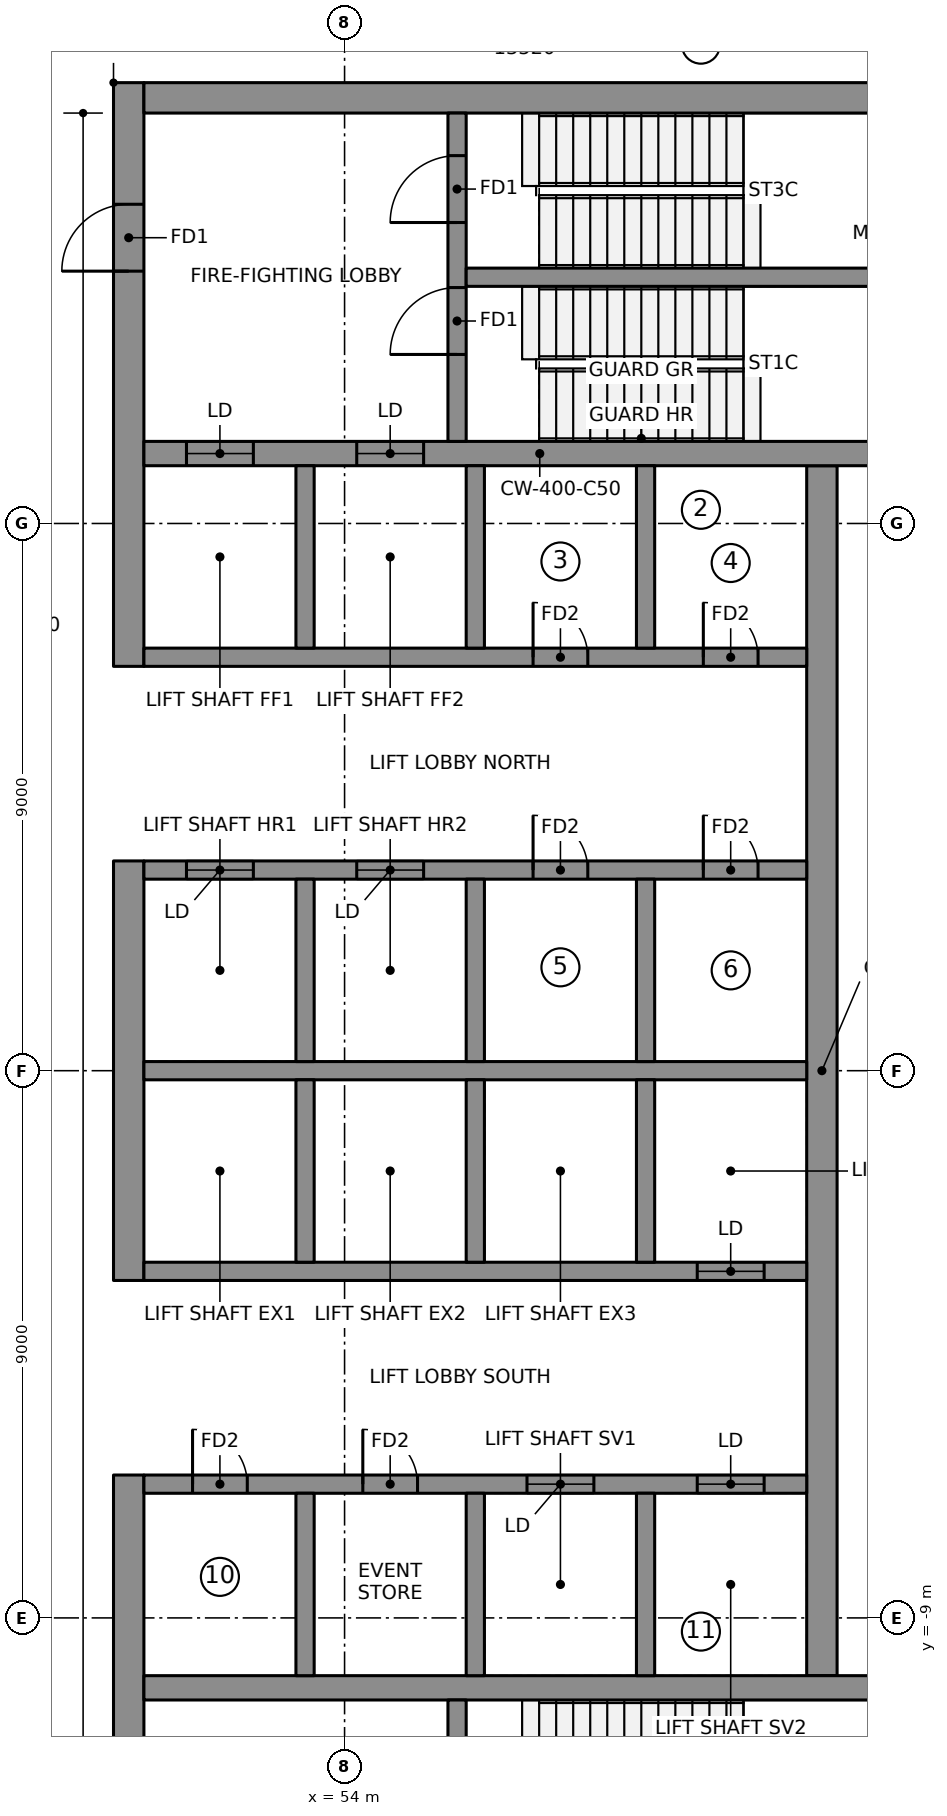
"""IFC4 building model, lengths in metres.
Left out: names, types, materials, properties, quantities, classifications, styles, units other than length and angle.
Written with IfcOpenShell. Run it as: python <this file> out.ifc"""

import sys

from ifc_helpers import new_model, si_unit, direction, frame, frame_2d, origin, place, context, subcontext, project, spatial, rectangle, extrude, element, fill, save


model = new_model("IFC4")
c1 = context("Model", 3, precision=1e-05, world=origin(), true_north=direction((0.0, 1.0)))
c2 = subcontext(c1, "Body", "Model", "MODEL_VIEW")
j1 = project(units=[si_unit("LENGTHUNIT", "METRE"), si_unit("PLANEANGLEUNIT", "RADIAN")], contexts=[c1])
p1 = place(None, origin())
s1 = spatial("IfcSite", under=j1, at=p1, CompositionType="ELEMENT")
p2 = place(p1, origin())
s2 = spatial("IfcBuilding", under=s1, at=p2, CompositionType="ELEMENT")
p3 = place(p2, frame((0.0, 0.0, 263.3)))
s3 = spatial("IfcBuildingStorey", under=s2, at=p3, CompositionType="ELEMENT", Elevation=263.3)
p4 = place(p3, frame((50.45, 6.65, 0.0), z_axis=(0.0, 0.0, 1.0), x_axis=(0.0, 1.0, 0.0)))
e1 = element("IfcWall", 1, at=p4, inside=s3, PredefinedType="SHEAR", context=c2, shape_type="SweptSolid", body=[
    extrude(rectangle(XDim=9.6, YDim=0.5, at=frame_2d((4.8, 0.0))), origin(), (0.0, 0.0, 1.0), 4.6),
])
p5 = place(p4, frame((6.5, 0.0, 0.0)))
e2 = element("IfcOpeningElement", 2, at=p5, cuts=e1, PredefinedType="OPENING", context=c2, shape_type="SweptSolid", body=[
    extrude(rectangle(XDim=1.1, YDim=2.1, at=frame_2d((0.55, 1.05))), frame((0.0, 0.26, 0.0), z_axis=(0.0, -1.0, 0.0), x_axis=(1.0, 0.0, 0.0)), (0.0, 0.0, 1.0), 0.52),
])
p6 = place(p3, frame((50.45, -3.45, 0.0), z_axis=(0.0, 0.0, 1.0), x_axis=(0.0, 1.0, 0.0)))
e3 = element("IfcWall", 3, at=p6, inside=s3, PredefinedType="SHEAR", context=c2, shape_type="SweptSolid", body=[
    extrude(rectangle(XDim=6.9, YDim=0.5, at=frame_2d((3.45, 0.0))), origin(), (0.0, 0.0, 1.0), 4.6),
])
p7 = place(p3, frame((50.45, -16.25, 0.0), z_axis=(0.0, 0.0, 1.0), x_axis=(0.0, 1.0, 0.0)))
e4 = element("IfcWall", 4, at=p7, inside=s3, PredefinedType="SHEAR", context=c2, shape_type="SweptSolid", body=[
    extrude(rectangle(XDim=9.6, YDim=0.5, at=frame_2d((4.8, 0.0))), origin(), (0.0, 0.0, 1.0), 4.6),
])
p8 = place(p7, frame((2.0, 0.0, 0.0)))
e5 = element("IfcOpeningElement", 5, at=p8, cuts=e4, PredefinedType="OPENING", context=c2, shape_type="SweptSolid", body=[
    extrude(rectangle(XDim=1.1, YDim=2.1, at=frame_2d((0.55, 1.05))), frame((0.0, 0.26, 0.0), z_axis=(0.0, -1.0, 0.0), x_axis=(1.0, 0.0, 0.0)), (0.0, 0.0, 1.0), 0.52),
])
p9 = place(p3, frame((50.7, 16.0, 0.0), z_axis=(0.0, 0.0, 1.0), x_axis=(1.0, 0.0, 0.0)))
e6 = element("IfcWall", 6, at=p9, inside=s3, PredefinedType="SHEAR", context=c2, shape_type="SweptSolid", body=[
    extrude(rectangle(XDim=13.52, YDim=0.5, at=frame_2d((6.76, 0.0))), origin(), (0.0, 0.0, 1.0), 4.6),
])
p10 = place(p3, frame((61.85, -9.95, 0.0), z_axis=(0.0, 0.0, 1.0), x_axis=(0.0, 1.0, 0.0)))
e7 = element("IfcWall", 7, at=p10, inside=s3, PredefinedType="SHEAR", context=c2, shape_type="SweptSolid", body=[
    extrude(rectangle(XDim=19.9, YDim=0.5, at=frame_2d((9.95, 0.0))), origin(), (0.0, 0.0, 1.0), 4.6),
])
p11 = place(p3, frame((50.7, 10.15, 0.0), z_axis=(0.0, 0.0, 1.0), x_axis=(1.0, 0.0, 0.0)))
e8 = element("IfcWall", 8, at=p11, inside=s3, PredefinedType="SHEAR", context=c2, shape_type="SweptSolid", body=[
    extrude(rectangle(XDim=13.02, YDim=0.4, at=frame_2d((6.51, 0.0))), origin(), (0.0, 0.0, 1.0), 4.6),
])
p12 = place(p11, frame((0.7, 0.0, 0.0)))
e9 = element("IfcOpeningElement", 9, at=p12, cuts=e8, PredefinedType="OPENING", context=c2, shape_type="SweptSolid", body=[
    extrude(rectangle(XDim=1.1, YDim=2.1, at=frame_2d((0.55, 1.05))), frame((0.0, 0.21, 0.0), z_axis=(0.0, -1.0, 0.0), x_axis=(1.0, 0.0, 0.0)), (0.0, 0.0, 1.0), 0.42),
])
p13 = place(p11, frame((3.5, 0.0, 0.0)))
e10 = element("IfcOpeningElement", 10, at=p13, cuts=e8, PredefinedType="OPENING", context=c2, shape_type="SweptSolid", body=[
    extrude(rectangle(XDim=1.1, YDim=2.1, at=frame_2d((0.55, 1.05))), frame((0.0, 0.21, 0.0), z_axis=(0.0, -1.0, 0.0), x_axis=(1.0, 0.0, 0.0)), (0.0, 0.0, 1.0), 0.42),
])
p14 = place(p3, frame((50.7, -10.15, 0.0), z_axis=(0.0, 0.0, 1.0), x_axis=(1.0, 0.0, 0.0)))
e11 = element("IfcWall", 11, at=p14, inside=s3, PredefinedType="SHEAR", context=c2, shape_type="SweptSolid", body=[
    extrude(rectangle(XDim=13.02, YDim=0.4, at=frame_2d((6.51, 0.0))), origin(), (0.0, 0.0, 1.0), 4.6),
])
p15 = place(p3, frame((50.7, 0.0, 0.0), z_axis=(0.0, 0.0, 1.0), x_axis=(1.0, 0.0, 0.0)))
e12 = element("IfcWall", 12, at=p15, inside=s3, PredefinedType="SHEAR", context=c2, shape_type="SweptSolid", body=[
    extrude(rectangle(XDim=10.9, YDim=0.3, at=frame_2d((5.45, 0.0))), origin(), (0.0, 0.0, 1.0), 4.6),
])
p16 = place(p3, frame((50.7, 3.3, 0.0), z_axis=(0.0, 0.0, 1.0), x_axis=(1.0, 0.0, 0.0)))
e13 = element("IfcWall", 13, at=p16, inside=s3, PredefinedType="SHEAR", context=c2, shape_type="SweptSolid", body=[
    extrude(rectangle(XDim=10.9, YDim=0.3, at=frame_2d((5.45, 0.0))), origin(), (0.0, 0.0, 1.0), 4.6),
])
p17 = place(p16, frame((0.7, 0.0, 0.0)))
e14 = element("IfcOpeningElement", 14, at=p17, cuts=e13, PredefinedType="OPENING", context=c2, shape_type="SweptSolid", body=[
    extrude(rectangle(XDim=1.1, YDim=2.1, at=frame_2d((0.55, 1.05))), frame((0.0, 0.16, 0.0), z_axis=(0.0, -1.0, 0.0), x_axis=(1.0, 0.0, 0.0)), (0.0, 0.0, 1.0), 0.32),
])
p18 = place(p16, frame((3.5, 0.0, 0.0)))
e15 = element("IfcOpeningElement", 15, at=p18, cuts=e13, PredefinedType="OPENING", context=c2, shape_type="SweptSolid", body=[
    extrude(rectangle(XDim=1.1, YDim=2.1, at=frame_2d((0.55, 1.05))), frame((0.0, 0.16, 0.0), z_axis=(0.0, -1.0, 0.0), x_axis=(1.0, 0.0, 0.0)), (0.0, 0.0, 1.0), 0.32),
])
p19 = place(p16, frame((6.4, 0.0, 0.0)))
e16 = element("IfcOpeningElement", 16, at=p19, cuts=e13, PredefinedType="OPENING", context=c2, shape_type="SweptSolid", body=[
    extrude(rectangle(XDim=0.9, YDim=2.1, at=frame_2d((0.45, 1.05))), frame((0.0, 0.16, 0.0), z_axis=(0.0, -1.0, 0.0), x_axis=(1.0, 0.0, 0.0)), (0.0, 0.0, 1.0), 0.32),
])
p20 = place(p16, frame((9.2, 0.0, 0.0)))
e17 = element("IfcOpeningElement", 17, at=p20, cuts=e13, PredefinedType="OPENING", context=c2, shape_type="SweptSolid", body=[
    extrude(rectangle(XDim=0.9, YDim=2.1, at=frame_2d((0.45, 1.05))), frame((0.0, 0.16, 0.0), z_axis=(0.0, -1.0, 0.0), x_axis=(1.0, 0.0, 0.0)), (0.0, 0.0, 1.0), 0.32),
])
p21 = place(p3, frame((50.7, 6.8, 0.0), z_axis=(0.0, 0.0, 1.0), x_axis=(1.0, 0.0, 0.0)))
e18 = element("IfcWall", 18, at=p21, inside=s3, PredefinedType="SHEAR", context=c2, shape_type="SweptSolid", body=[
    extrude(rectangle(XDim=10.9, YDim=0.3, at=frame_2d((5.45, 0.0))), origin(), (0.0, 0.0, 1.0), 4.6),
])
p22 = place(p21, frame((6.4, 0.0, 0.0)))
e19 = element("IfcOpeningElement", 19, at=p22, cuts=e18, PredefinedType="OPENING", context=c2, shape_type="SweptSolid", body=[
    extrude(rectangle(XDim=0.9, YDim=2.1, at=frame_2d((0.45, 1.05))), frame((0.0, 0.16, 0.0), z_axis=(0.0, -1.0, 0.0), x_axis=(1.0, 0.0, 0.0)), (0.0, 0.0, 1.0), 0.32),
])
p23 = place(p21, frame((9.2, 0.0, 0.0)))
e20 = element("IfcOpeningElement", 20, at=p23, cuts=e18, PredefinedType="OPENING", context=c2, shape_type="SweptSolid", body=[
    extrude(rectangle(XDim=0.9, YDim=2.1, at=frame_2d((0.45, 1.05))), frame((0.0, 0.16, 0.0), z_axis=(0.0, -1.0, 0.0), x_axis=(1.0, 0.0, 0.0)), (0.0, 0.0, 1.0), 0.32),
])
for number, where, z_axis, x_axis in (
    (21, (53.35, 0.15, 0.0), (0.0, 0.0, 1.0), (0.0, 1.0, 0.0)),
    (22, (53.35, 6.95, 0.0), (0.0, 0.0, 1.0), (0.0, 1.0, 0.0)),
    (23, (56.15, 0.15, 0.0), (0.0, 0.0, 1.0), (0.0, 1.0, 0.0)),
    (24, (56.15, 6.95, 0.0), (0.0, 0.0, 1.0), (0.0, 1.0, 0.0)),
    (25, (58.95, 0.15, 0.0), (0.0, 0.0, 1.0), (0.0, 1.0, 0.0)),
    (26, (58.95, 6.95, 0.0), (0.0, 0.0, 1.0), (0.0, 1.0, 0.0)),
):
    element("IfcWall", number, at=place(p3, frame(where, z_axis=z_axis, x_axis=x_axis)), inside=s3, PredefinedType="SHEAR", context=c2, shape_type="SweptSolid", body=[
        extrude(rectangle(XDim=3.0, YDim=0.3, at=frame_2d((1.5, 0.0))), origin(), (0.0, 0.0, 1.0), 4.6),
    ])
p24 = place(p3, frame((50.7, -3.3, 0.0), z_axis=(0.0, 0.0, 1.0), x_axis=(1.0, 0.0, 0.0)))
e27 = element("IfcWall", 27, at=p24, inside=s3, PredefinedType="SHEAR", context=c2, shape_type="SweptSolid", body=[
    extrude(rectangle(XDim=10.9, YDim=0.3, at=frame_2d((5.45, 0.0))), origin(), (0.0, 0.0, 1.0), 4.6),
])
p25 = place(p24, frame((9.1, 0.0, 0.0)))
e28 = element("IfcOpeningElement", 28, at=p25, cuts=e27, PredefinedType="OPENING", context=c2, shape_type="SweptSolid", body=[
    extrude(rectangle(XDim=1.1, YDim=2.1, at=frame_2d((0.55, 1.05))), frame((0.0, 0.16, 0.0), z_axis=(0.0, -1.0, 0.0), x_axis=(1.0, 0.0, 0.0)), (0.0, 0.0, 1.0), 0.32),
])
p26 = place(p3, frame((50.7, -6.8, 0.0), z_axis=(0.0, 0.0, 1.0), x_axis=(1.0, 0.0, 0.0)))
e29 = element("IfcWall", 29, at=p26, inside=s3, PredefinedType="SHEAR", context=c2, shape_type="SweptSolid", body=[
    extrude(rectangle(XDim=10.9, YDim=0.3, at=frame_2d((5.45, 0.0))), origin(), (0.0, 0.0, 1.0), 4.6),
])
p27 = place(p26, frame((6.3, 0.0, 0.0)))
e30 = element("IfcOpeningElement", 30, at=p27, cuts=e29, PredefinedType="OPENING", context=c2, shape_type="SweptSolid", body=[
    extrude(rectangle(XDim=1.1, YDim=2.1, at=frame_2d((0.55, 1.05))), frame((0.0, 0.16, 0.0), z_axis=(0.0, -1.0, 0.0), x_axis=(1.0, 0.0, 0.0)), (0.0, 0.0, 1.0), 0.32),
])
p28 = place(p26, frame((9.1, 0.0, 0.0)))
e31 = element("IfcOpeningElement", 31, at=p28, cuts=e29, PredefinedType="OPENING", context=c2, shape_type="SweptSolid", body=[
    extrude(rectangle(XDim=1.1, YDim=2.1, at=frame_2d((0.55, 1.05))), frame((0.0, 0.16, 0.0), z_axis=(0.0, -1.0, 0.0), x_axis=(1.0, 0.0, 0.0)), (0.0, 0.0, 1.0), 0.32),
])
p29 = place(p26, frame((0.8, 0.0, 0.0)))
e32 = element("IfcOpeningElement", 32, at=p29, cuts=e29, PredefinedType="OPENING", context=c2, shape_type="SweptSolid", body=[
    extrude(rectangle(XDim=0.9, YDim=2.1, at=frame_2d((0.45, 1.05))), frame((0.0, 0.16, 0.0), z_axis=(0.0, -1.0, 0.0), x_axis=(1.0, 0.0, 0.0)), (0.0, 0.0, 1.0), 0.32),
])
p30 = place(p26, frame((3.6, 0.0, 0.0)))
e33 = element("IfcOpeningElement", 33, at=p30, cuts=e29, PredefinedType="OPENING", context=c2, shape_type="SweptSolid", body=[
    extrude(rectangle(XDim=0.9, YDim=2.1, at=frame_2d((0.45, 1.05))), frame((0.0, 0.16, 0.0), z_axis=(0.0, -1.0, 0.0), x_axis=(1.0, 0.0, 0.0)), (0.0, 0.0, 1.0), 0.32),
])
for number, where, z_axis, x_axis in (
    (34, (53.35, -3.15, 0.0), (0.0, 0.0, 1.0), (0.0, 1.0, 0.0)),
    (35, (53.35, -9.95, 0.0), (0.0, 0.0, 1.0), (0.0, 1.0, 0.0)),
    (36, (56.15, -3.15, 0.0), (0.0, 0.0, 1.0), (0.0, 1.0, 0.0)),
    (37, (56.15, -9.95, 0.0), (0.0, 0.0, 1.0), (0.0, 1.0, 0.0)),
    (38, (58.95, -3.15, 0.0), (0.0, 0.0, 1.0), (0.0, 1.0, 0.0)),
    (39, (58.95, -9.95, 0.0), (0.0, 0.0, 1.0), (0.0, 1.0, 0.0)),
):
    element("IfcWall", number, at=place(p3, frame(where, z_axis=z_axis, x_axis=x_axis)), inside=s3, PredefinedType="SHEAR", context=c2, shape_type="SweptSolid", body=[
        extrude(rectangle(XDim=3.0, YDim=0.3, at=frame_2d((1.5, 0.0))), origin(), (0.0, 0.0, 1.0), 4.6),
    ])
p31 = place(p3, frame((55.85, 10.35, 0.0), z_axis=(0.0, 0.0, 1.0), x_axis=(0.0, 1.0, 0.0)))
e40 = element("IfcWall", 40, at=p31, inside=s3, PredefinedType="SHEAR", context=c2, shape_type="SweptSolid", body=[
    extrude(rectangle(XDim=5.4, YDim=0.3, at=frame_2d((2.7, 0.0))), origin(), (0.0, 0.0, 1.0), 4.6),
])
p32 = place(p31, frame((1.43, 0.0, 0.0)))
e41 = element("IfcOpeningElement", 41, at=p32, cuts=e40, PredefinedType="OPENING", context=c2, shape_type="SweptSolid", body=[
    extrude(rectangle(XDim=1.1, YDim=2.1, at=frame_2d((0.55, 1.05))), frame((0.0, 0.16, 0.0), z_axis=(0.0, -1.0, 0.0), x_axis=(1.0, 0.0, 0.0)), (0.0, 0.0, 1.0), 0.32),
])
p33 = place(p31, frame((3.6, 0.0, 0.0)))
e42 = element("IfcOpeningElement", 42, at=p33, cuts=e40, PredefinedType="OPENING", context=c2, shape_type="SweptSolid", body=[
    extrude(rectangle(XDim=1.1, YDim=2.1, at=frame_2d((0.55, 1.05))), frame((0.0, 0.16, 0.0), z_axis=(0.0, -1.0, 0.0), x_axis=(1.0, 0.0, 0.0)), (0.0, 0.0, 1.0), 0.32),
])
p34 = place(p3, frame((55.85, -15.75, 0.0), z_axis=(0.0, 0.0, 1.0), x_axis=(0.0, 1.0, 0.0)))
e43 = element("IfcWall", 43, at=p34, inside=s3, PredefinedType="SHEAR", context=c2, shape_type="SweptSolid", body=[
    extrude(rectangle(XDim=5.4, YDim=0.3, at=frame_2d((2.7, 0.0))), origin(), (0.0, 0.0, 1.0), 4.6),
])
p35 = place(p34, frame((3.6, 0.0, 0.0)))
e44 = element("IfcOpeningElement", 44, at=p35, cuts=e43, PredefinedType="OPENING", context=c2, shape_type="SweptSolid", body=[
    extrude(rectangle(XDim=1.1, YDim=2.1, at=frame_2d((0.55, 1.05))), frame((0.0, 0.16, 0.0), z_axis=(0.0, -1.0, 0.0), x_axis=(1.0, 0.0, 0.0)), (0.0, 0.0, 1.0), 0.32),
])
p36 = place(p34, frame((0.8, 0.0, 0.0)))
e45 = element("IfcOpeningElement", 45, at=p36, cuts=e43, PredefinedType="OPENING", context=c2, shape_type="SweptSolid", body=[
    extrude(rectangle(XDim=0.9, YDim=2.1, at=frame_2d((0.45, 1.05))), frame((0.0, 0.16, 0.0), z_axis=(0.0, -1.0, 0.0), x_axis=(1.0, 0.0, 0.0)), (0.0, 0.0, 1.0), 0.32),
])
p37 = place(p3, frame((56.0, 13.05, 0.0), z_axis=(0.0, 0.0, 1.0), x_axis=(1.0, 0.0, 0.0)))
e46 = element("IfcWall", 46, at=p37, inside=s3, PredefinedType="SHEAR", context=c2, shape_type="SweptSolid", body=[
    extrude(rectangle(XDim=7.72, YDim=0.3, at=frame_2d((3.86, 0.0))), origin(), (0.0, 0.0, 1.0), 4.6),
])
p38 = place(p12, origin())
e47 = element("IfcDoor", 47, at=p38, inside=s3, OperationType="DOUBLE_DOOR_SLIDING", PredefinedType="DOOR", context=c2, shape_type="SweptSolid", body=[
    extrude(rectangle(XDim=1.1, YDim=2.1, at=frame_2d((0.55, 1.05))), frame((0.0, 0.025, 0.0), z_axis=(0.0, -1.0, 0.0), x_axis=(1.0, 0.0, 0.0)), (0.0, 0.0, 1.0), 0.05),
])
fill(e9, e47)
p39 = place(p13, origin())
e48 = element("IfcDoor", 48, at=p39, inside=s3, OperationType="DOUBLE_DOOR_SLIDING", PredefinedType="DOOR", context=c2, shape_type="SweptSolid", body=[
    extrude(rectangle(XDim=1.1, YDim=2.1, at=frame_2d((0.55, 1.05))), frame((0.0, 0.025, 0.0), z_axis=(0.0, -1.0, 0.0), x_axis=(1.0, 0.0, 0.0)), (0.0, 0.0, 1.0), 0.05),
])
fill(e10, e48)
p40 = place(p17, origin())
e49 = element("IfcDoor", 49, at=p40, inside=s3, OperationType="DOUBLE_DOOR_SLIDING", PredefinedType="DOOR", context=c2, shape_type="SweptSolid", body=[
    extrude(rectangle(XDim=1.1, YDim=2.1, at=frame_2d((0.55, 1.05))), frame((0.0, 0.025, 0.0), z_axis=(0.0, -1.0, 0.0), x_axis=(1.0, 0.0, 0.0)), (0.0, 0.0, 1.0), 0.05),
])
fill(e14, e49)
p41 = place(p18, origin())
e50 = element("IfcDoor", 50, at=p41, inside=s3, OperationType="DOUBLE_DOOR_SLIDING", PredefinedType="DOOR", context=c2, shape_type="SweptSolid", body=[
    extrude(rectangle(XDim=1.1, YDim=2.1, at=frame_2d((0.55, 1.05))), frame((0.0, 0.025, 0.0), z_axis=(0.0, -1.0, 0.0), x_axis=(1.0, 0.0, 0.0)), (0.0, 0.0, 1.0), 0.05),
])
fill(e15, e50)
p42 = place(p25, origin())
e51 = element("IfcDoor", 51, at=p42, inside=s3, OperationType="DOUBLE_DOOR_SLIDING", PredefinedType="DOOR", context=c2, shape_type="SweptSolid", body=[
    extrude(rectangle(XDim=1.1, YDim=2.1, at=frame_2d((0.55, 1.05))), frame((0.0, 0.025, 0.0), z_axis=(0.0, -1.0, 0.0), x_axis=(1.0, 0.0, 0.0)), (0.0, 0.0, 1.0), 0.05),
])
fill(e28, e51)
p43 = place(p27, origin())
e52 = element("IfcDoor", 52, at=p43, inside=s3, OperationType="DOUBLE_DOOR_SLIDING", PredefinedType="DOOR", context=c2, shape_type="SweptSolid", body=[
    extrude(rectangle(XDim=1.1, YDim=2.1, at=frame_2d((0.55, 1.05))), frame((0.0, 0.025, 0.0), z_axis=(0.0, -1.0, 0.0), x_axis=(1.0, 0.0, 0.0)), (0.0, 0.0, 1.0), 0.05),
])
fill(e30, e52)
p44 = place(p28, origin())
e53 = element("IfcDoor", 53, at=p44, inside=s3, OperationType="DOUBLE_DOOR_SLIDING", PredefinedType="DOOR", context=c2, shape_type="SweptSolid", body=[
    extrude(rectangle(XDim=1.1, YDim=2.1, at=frame_2d((0.55, 1.05))), frame((0.0, 0.025, 0.0), z_axis=(0.0, -1.0, 0.0), x_axis=(1.0, 0.0, 0.0)), (0.0, 0.0, 1.0), 0.05),
])
fill(e31, e53)
p45 = place(p32, origin())
e54 = element("IfcDoor", 54, at=p45, inside=s3, OperationType="SINGLE_SWING_RIGHT", PredefinedType="DOOR", context=c2, shape_type="SweptSolid", body=[
    extrude(rectangle(XDim=1.1, YDim=2.1, at=frame_2d((0.55, 1.05))), frame((0.0, 0.025, 0.0), z_axis=(0.0, -1.0, 0.0), x_axis=(1.0, 0.0, 0.0)), (0.0, 0.0, 1.0), 0.05),
])
fill(e41, e54)
p46 = place(p33, origin())
e55 = element("IfcDoor", 55, at=p46, inside=s3, OperationType="SINGLE_SWING_RIGHT", PredefinedType="DOOR", context=c2, shape_type="SweptSolid", body=[
    extrude(rectangle(XDim=1.1, YDim=2.1, at=frame_2d((0.55, 1.05))), frame((0.0, 0.025, 0.0), z_axis=(0.0, -1.0, 0.0), x_axis=(1.0, 0.0, 0.0)), (0.0, 0.0, 1.0), 0.05),
])
fill(e42, e55)
p47 = place(p5, origin())
e56 = element("IfcDoor", 56, at=p47, inside=s3, OperationType="SINGLE_SWING_RIGHT", PredefinedType="DOOR", context=c2, shape_type="SweptSolid", body=[
    extrude(rectangle(XDim=1.1, YDim=2.1, at=frame_2d((0.55, 1.05))), frame((0.0, 0.025, 0.0), z_axis=(0.0, -1.0, 0.0), x_axis=(1.0, 0.0, 0.0)), (0.0, 0.0, 1.0), 0.05),
])
fill(e2, e56)
p48 = place(p22, origin())
e57 = element("IfcDoor", 57, at=p48, inside=s3, OperationType="SINGLE_SWING_LEFT", PredefinedType="DOOR", context=c2, shape_type="SweptSolid", body=[
    extrude(rectangle(XDim=0.9, YDim=2.1, at=frame_2d((0.45, 1.05))), frame((0.0, 0.025, 0.0), z_axis=(0.0, -1.0, 0.0), x_axis=(1.0, 0.0, 0.0)), (0.0, 0.0, 1.0), 0.05),
])
fill(e19, e57)
p49 = place(p23, origin())
e58 = element("IfcDoor", 58, at=p49, inside=s3, OperationType="SINGLE_SWING_LEFT", PredefinedType="DOOR", context=c2, shape_type="SweptSolid", body=[
    extrude(rectangle(XDim=0.9, YDim=2.1, at=frame_2d((0.45, 1.05))), frame((0.0, 0.025, 0.0), z_axis=(0.0, -1.0, 0.0), x_axis=(1.0, 0.0, 0.0)), (0.0, 0.0, 1.0), 0.05),
])
fill(e20, e58)
p50 = place(p19, origin())
e59 = element("IfcDoor", 59, at=p50, inside=s3, OperationType="SINGLE_SWING_LEFT", PredefinedType="DOOR", context=c2, shape_type="SweptSolid", body=[
    extrude(rectangle(XDim=0.9, YDim=2.1, at=frame_2d((0.45, 1.05))), frame((0.0, 0.025, 0.0), z_axis=(0.0, -1.0, 0.0), x_axis=(1.0, 0.0, 0.0)), (0.0, 0.0, 1.0), 0.05),
])
fill(e16, e59)
p51 = place(p20, origin())
e60 = element("IfcDoor", 60, at=p51, inside=s3, OperationType="SINGLE_SWING_LEFT", PredefinedType="DOOR", context=c2, shape_type="SweptSolid", body=[
    extrude(rectangle(XDim=0.9, YDim=2.1, at=frame_2d((0.45, 1.05))), frame((0.0, 0.025, 0.0), z_axis=(0.0, -1.0, 0.0), x_axis=(1.0, 0.0, 0.0)), (0.0, 0.0, 1.0), 0.05),
])
fill(e17, e60)
p52 = place(p29, origin())
e61 = element("IfcDoor", 61, at=p52, inside=s3, OperationType="SINGLE_SWING_LEFT", PredefinedType="DOOR", context=c2, shape_type="SweptSolid", body=[
    extrude(rectangle(XDim=0.9, YDim=2.1, at=frame_2d((0.45, 1.05))), frame((0.0, 0.025, 0.0), z_axis=(0.0, -1.0, 0.0), x_axis=(1.0, 0.0, 0.0)), (0.0, 0.0, 1.0), 0.05),
])
fill(e32, e61)
p53 = place(p30, origin())
e62 = element("IfcDoor", 62, at=p53, inside=s3, OperationType="SINGLE_SWING_LEFT", PredefinedType="DOOR", context=c2, shape_type="SweptSolid", body=[
    extrude(rectangle(XDim=0.9, YDim=2.1, at=frame_2d((0.45, 1.05))), frame((0.0, 0.025, 0.0), z_axis=(0.0, -1.0, 0.0), x_axis=(1.0, 0.0, 0.0)), (0.0, 0.0, 1.0), 0.05),
])
fill(e33, e62)
save(model, sys.argv[1])
